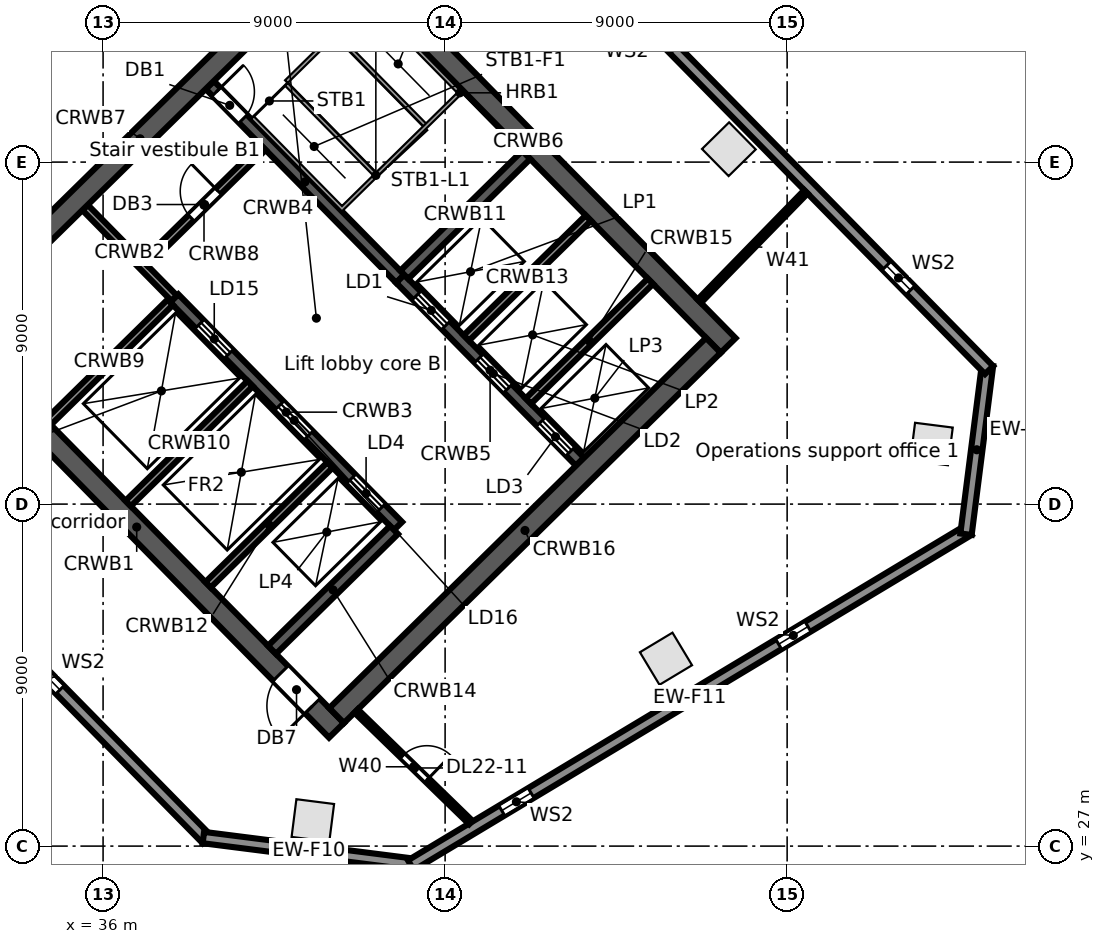
"""IFC4 building model, lengths in metres.
Left out: names, types, materials, properties, quantities, classifications, styles, units other than length and angle.
Written with IfcOpenShell. Run it as: python <this file> out.ifc"""

import sys

from ifc_helpers import new_model, si_unit, direction, frame, frame_2d, origin, origin_2d, place, context, subcontext, project, spatial, rectangle, extrude, element, fill, save


model = new_model("IFC4")
c1 = context("Model", 3, precision=1e-05, world=origin(), true_north=direction((0.0, 1.0)))
c2 = subcontext(c1, "Body", "Model", "MODEL_VIEW")
j1 = project(units=[si_unit("LENGTHUNIT", "METRE"), si_unit("PLANEANGLEUNIT", "RADIAN")], contexts=[c1])
p1 = place(None, origin())
s1 = spatial("IfcSite", under=j1, at=p1, CompositionType="ELEMENT")
p2 = place(p1, origin())
s2 = spatial("IfcBuilding", under=s1, at=p2, CompositionType="ELEMENT")
p3 = place(p2, frame((0.0, 0.0, 110.3)))
s3 = spatial("IfcBuildingStorey", under=s2, at=p3, CompositionType="ELEMENT", Elevation=110.3)
for number, where, z_axis, x_axis in (
    (1, (41.52, 27.675, 0.0), (0.0, 0.0, 1.0), (0.992, -0.126, 0.0)),
    (2, (50.812, 31.931, 0.0), (0.0, 0.0, 1.0), (0.857, 0.515, 0.0)),
    (3, (57.799, 37.581, 0.0), (0.0, 0.0, 1.0), (0.126, 0.992, 0.0)),
    (4, (52.467, 45.339, 0.0), (0.0, 0.0, 1.0), (-0.701, 0.713, 0.0)),
):
    element("IfcColumn", number, at=place(p3, frame(where, z_axis=z_axis, x_axis=x_axis)), inside=s3, PredefinedType="COLUMN", context=c2, shape_type="SweptSolid", body=[
        extrude(rectangle(XDim=1.0, YDim=1.0, at=origin_2d()), origin(), (0.0, 0.0, 1.0), 4.4),
    ])
p4 = place(p3, frame((38.727, 27.181, 0.0), z_axis=(0.0, 0.0, 1.0), x_axis=(-0.700906405975, 0.713253258011, 0.0)))
e5 = element("IfcWall", 5, at=p4, inside=s3, PredefinedType="STANDARD", context=c2, shape_type="SweptSolid", body=[
    extrude(rectangle(XDim=18.923, YDim=0.3, at=frame_2d((9.462, 0.0))), origin(), (0.0, 0.0, 1.0), 4.08),
])
p5 = place(p4, frame((14.967, 0.0, 0.6)))
e6 = element("IfcOpeningElement", 6, at=p5, cuts=e5, PredefinedType="OPENING", context=c2, shape_type="SweptSolid", body=[
    extrude(rectangle(XDim=0.9, YDim=2.8, at=frame_2d((0.45, 1.4))), frame((0.0, 0.16, 0.0), z_axis=(0.0, -1.0, 0.0), x_axis=(1.0, 0.0, 0.0)), (0.0, 0.0, 1.0), 0.32),
])
p6 = place(p4, frame((5.512, 0.0, 0.6)))
e7 = element("IfcOpeningElement", 7, at=p6, cuts=e5, PredefinedType="OPENING", context=c2, shape_type="SweptSolid", body=[
    extrude(rectangle(XDim=0.9, YDim=2.8, at=frame_2d((0.45, 1.4))), frame((0.0, 0.16, 0.0), z_axis=(0.0, -1.0, 0.0), x_axis=(1.0, 0.0, 0.0)), (0.0, 0.0, 1.0), 0.32),
])
p7 = place(p3, frame((44.196, 26.518, 0.0), z_axis=(0.0, 0.0, 1.0), x_axis=(-0.992001881269, 0.126223086474, 0.0)))
e8 = element("IfcWall", 8, at=p7, inside=s3, PredefinedType="STANDARD", context=c2, shape_type="SweptSolid", body=[
    extrude(rectangle(XDim=5.602, YDim=0.3, at=frame_2d((2.801, 0.0))), origin(), (0.0, 0.0, 1.0), 4.08),
])
p8 = place(p3, frame((58.778, 35.318, 0.0), z_axis=(0.0, 0.0, 1.0), x_axis=(-0.857168206138, -0.515036568009, 0.0)))
e9 = element("IfcWall", 9, at=p8, inside=s3, PredefinedType="STANDARD", context=c2, shape_type="SweptSolid", body=[
    extrude(rectangle(XDim=17.125, YDim=0.3, at=frame_2d((8.562, 0.0))), origin(), (0.0, 0.0, 1.0), 4.08),
])
p9 = place(p8, frame((13.435, 0.0, 0.6)))
e10 = element("IfcOpeningElement", 10, at=p9, cuts=e9, PredefinedType="OPENING", context=c2, shape_type="SweptSolid", body=[
    extrude(rectangle(XDim=0.9, YDim=2.8, at=frame_2d((0.45, 1.4))), frame((0.0, 0.16, 0.0), z_axis=(0.0, -1.0, 0.0), x_axis=(1.0, 0.0, 0.0)), (0.0, 0.0, 1.0), 0.32),
])
p10 = place(p8, frame((4.935, 0.0, 0.6)))
e11 = element("IfcOpeningElement", 11, at=p10, cuts=e9, PredefinedType="OPENING", context=c2, shape_type="SweptSolid", body=[
    extrude(rectangle(XDim=0.9, YDim=2.8, at=frame_2d((0.45, 1.4))), frame((0.0, 0.16, 0.0), z_axis=(0.0, -1.0, 0.0), x_axis=(1.0, 0.0, 0.0)), (0.0, 0.0, 1.0), 0.32),
])
p11 = place(p3, frame((59.272, 39.651, 0.0), z_axis=(0.0, 0.0, 1.0), x_axis=(-0.126181137886, -0.992007217938, 0.0)))
e12 = element("IfcWall", 12, at=p11, inside=s3, PredefinedType="STANDARD", context=c2, shape_type="SweptSolid", body=[
    extrude(rectangle(XDim=4.479, YDim=0.3, at=frame_2d((2.24, 0.0))), origin(), (0.0, 0.0, 1.0), 4.08),
])
p12 = place(p3, frame((40.594, 58.577, 0.0), z_axis=(0.0, 0.0, 1.0), x_axis=(0.700909719808, -0.713250001528, 0.0)))
e13 = element("IfcWall", 13, at=p12, inside=s3, PredefinedType="STANDARD", context=c2, shape_type="SweptSolid", body=[
    extrude(rectangle(XDim=26.708, YDim=0.3, at=frame_2d((13.354, 0.0))), origin(), (0.0, 0.0, 1.0), 4.08),
])
p13 = place(p12, frame((22.858, 0.0, 0.6)))
e14 = element("IfcOpeningElement", 14, at=p13, cuts=e13, PredefinedType="OPENING", context=c2, shape_type="SweptSolid", body=[
    extrude(rectangle(XDim=0.9, YDim=2.8, at=frame_2d((0.45, 1.4))), frame((0.0, 0.16, 0.0), z_axis=(0.0, -1.0, 0.0), x_axis=(1.0, 0.0, 0.0)), (0.0, 0.0, 1.0), 0.32),
])
p14 = place(p12, frame((13.987, 0.0, 0.6)))
e15 = element("IfcOpeningElement", 15, at=p14, cuts=e13, PredefinedType="OPENING", context=c2, shape_type="SweptSolid", body=[
    extrude(rectangle(XDim=0.9, YDim=2.8, at=frame_2d((0.45, 1.4))), frame((0.0, 0.16, 0.0), z_axis=(0.0, -1.0, 0.0), x_axis=(1.0, 0.0, 0.0)), (0.0, 0.0, 1.0), 0.32),
])
p15 = place(p12, frame((5.115, 0.0, 0.6)))
e16 = element("IfcOpeningElement", 16, at=p15, cuts=e13, PredefinedType="OPENING", context=c2, shape_type="SweptSolid", body=[
    extrude(rectangle(XDim=0.9, YDim=2.8, at=frame_2d((0.45, 1.4))), frame((0.0, 0.16, 0.0), z_axis=(0.0, -1.0, 0.0), x_axis=(1.0, 0.0, 0.0)), (0.0, 0.0, 1.0), 0.32),
])
p16 = place(p3, frame((31.628, 40.745, 0.0), z_axis=(0.0, 0.0, 1.0), x_axis=(0.700911255944, -0.713248491965, 0.0)))
e17 = element("IfcWall", 17, at=p16, inside=s3, PredefinedType="SOLIDWALL", context=c2, shape_type="SweptSolid", body=[
    extrude(rectangle(XDim=15.0, YDim=0.55, at=frame_2d((7.5, 0.0))), origin(), (0.0, 0.0, 1.0), 4.08),
])
p17 = place(p16, frame((12.9, 0.0, 0.0)))
e18 = element("IfcOpeningElement", 18, at=p17, cuts=e17, PredefinedType="OPENING", context=c2, shape_type="SweptSolid", body=[
    extrude(rectangle(XDim=1.2, YDim=2.1, at=frame_2d((0.6, 1.05))), frame((0.0, 0.285, 0.0), z_axis=(0.0, -1.0, 0.0), x_axis=(1.0, 0.0, 0.0)), (0.0, 0.0, 1.0), 0.57),
])
p18 = place(p3, frame((35.526, 43.805, 0.0), z_axis=(0.0, 0.0, 1.0), x_axis=(0.700884863746, -0.713274426691, 0.0)))
e19 = element("IfcWall", 19, at=p18, inside=s3, PredefinedType="SOLIDWALL", context=c2, shape_type="SweptSolid", body=[
    extrude(rectangle(XDim=3.35, YDim=0.2, at=frame_2d((1.675, 0.0))), origin(), (0.0, 0.0, 1.0), 4.08),
])
p19 = place(p3, frame((37.874, 41.416, 0.0), z_axis=(0.0, 0.0, 1.0), x_axis=(0.700918271237, -0.71324159795, 0.0)))
e20 = element("IfcWall", 20, at=p19, inside=s3, PredefinedType="SOLIDWALL", context=c2, shape_type="SweptSolid", body=[
    extrude(rectangle(XDim=8.4, YDim=0.3, at=frame_2d((4.2, 0.0))), origin(), (0.0, 0.0, 1.0), 4.08),
])
p20 = place(p19, frame((0.95, 0.0, 0.0)))
e21 = element("IfcOpeningElement", 21, at=p20, cuts=e20, PredefinedType="OPENING", context=c2, shape_type="SweptSolid", body=[
    extrude(rectangle(XDim=1.1, YDim=2.1, at=frame_2d((0.55, 1.05))), frame((0.0, 0.16, 0.0), z_axis=(0.0, -1.0, 0.0), x_axis=(1.0, 0.0, 0.0)), (0.0, 0.0, 1.0), 0.32),
])
p21 = place(p19, frame((3.95, 0.0, 0.0)))
e22 = element("IfcOpeningElement", 22, at=p21, cuts=e20, PredefinedType="OPENING", context=c2, shape_type="SweptSolid", body=[
    extrude(rectangle(XDim=1.1, YDim=2.1, at=frame_2d((0.55, 1.05))), frame((0.0, 0.16, 0.0), z_axis=(0.0, -1.0, 0.0), x_axis=(1.0, 0.0, 0.0)), (0.0, 0.0, 1.0), 0.32),
])
p22 = place(p19, frame((6.65, 0.0, 0.0)))
e23 = element("IfcOpeningElement", 23, at=p22, cuts=e20, PredefinedType="OPENING", context=c2, shape_type="SweptSolid", body=[
    extrude(rectangle(XDim=1.1, YDim=2.1, at=frame_2d((0.55, 1.05))), frame((0.0, 0.16, 0.0), z_axis=(0.0, -1.0, 0.0), x_axis=(1.0, 0.0, 0.0)), (0.0, 0.0, 1.0), 0.32),
])
p23 = place(p3, frame((38.807, 47.029, 0.0), z_axis=(0.0, 0.0, 1.0), x_axis=(0.700916852778, -0.713242991898, 0.0)))
e24 = element("IfcWall", 24, at=p23, inside=s3, PredefinedType="SOLIDWALL", context=c2, shape_type="SweptSolid", body=[
    extrude(rectangle(XDim=7.15, YDim=0.3, at=frame_2d((3.575, 0.0))), origin(), (0.0, 0.0, 1.0), 4.08),
])
p24 = place(p23, frame((0.25, 0.0, 0.0)))
e25 = element("IfcOpeningElement", 25, at=p24, cuts=e24, PredefinedType="OPENING", context=c2, shape_type="SweptSolid", body=[
    extrude(rectangle(XDim=1.0, YDim=2.1, at=frame_2d((0.5, 1.05))), frame((0.0, 0.16, 0.0), z_axis=(0.0, -1.0, 0.0), x_axis=(1.0, 0.0, 0.0)), (0.0, 0.0, 1.0), 0.32),
])
p25 = place(p3, frame((43.819, 41.929, 0.0), z_axis=(0.0, 0.0, 1.0), x_axis=(0.700931209592, -0.713228882912, 0.0)))
e26 = element("IfcWall", 26, at=p25, inside=s3, PredefinedType="SOLIDWALL", context=c2, shape_type="SweptSolid", body=[
    extrude(rectangle(XDim=6.75, YDim=0.3, at=frame_2d((3.375, 0.0))), origin(), (0.0, 0.0, 1.0), 4.08),
])
p26 = place(p25, frame((0.615, 0.0, 0.0)))
e27 = element("IfcOpeningElement", 27, at=p26, cuts=e26, PredefinedType="OPENING", context=c2, shape_type="SweptSolid", body=[
    extrude(rectangle(XDim=1.1, YDim=2.1, at=frame_2d((0.55, 1.05))), frame((0.0, 0.16, 0.0), z_axis=(0.0, -1.0, 0.0), x_axis=(1.0, 0.0, 0.0)), (0.0, 0.0, 1.0), 0.32),
])
p27 = place(p25, frame((2.945, 0.0, 0.0)))
e28 = element("IfcOpeningElement", 28, at=p27, cuts=e26, PredefinedType="OPENING", context=c2, shape_type="SweptSolid", body=[
    extrude(rectangle(XDim=1.1, YDim=2.1, at=frame_2d((0.55, 1.05))), frame((0.0, 0.16, 0.0), z_axis=(0.0, -1.0, 0.0), x_axis=(1.0, 0.0, 0.0)), (0.0, 0.0, 1.0), 0.32),
])
p28 = place(p25, frame((5.28, 0.0, 0.0)))
e29 = element("IfcOpeningElement", 29, at=p28, cuts=e26, PredefinedType="OPENING", context=c2, shape_type="SweptSolid", body=[
    extrude(rectangle(XDim=1.1, YDim=2.1, at=frame_2d((0.55, 1.05))), frame((0.0, 0.16, 0.0), z_axis=(0.0, -1.0, 0.0), x_axis=(1.0, 0.0, 0.0)), (0.0, 0.0, 1.0), 0.32),
])
p29 = place(p3, frame((41.934, 50.873, 0.0), z_axis=(0.0, 0.0, 1.0), x_axis=(0.700911255944, -0.713248491965, 0.0)))
e30 = element("IfcWall", 30, at=p29, inside=s3, PredefinedType="SOLIDWALL", context=c2, shape_type="SweptSolid", body=[
    extrude(rectangle(XDim=15.0, YDim=0.55, at=frame_2d((7.5, 0.0))), origin(), (0.0, 0.0, 1.0), 4.08),
])
p30 = place(p3, frame((32.017, 40.742, 0.0), z_axis=(0.0, 0.0, 1.0), x_axis=(0.713253550094, 0.700906108746, 0.0)))
e31 = element("IfcWall", 31, at=p30, inside=s3, PredefinedType="SOLIDWALL", context=c2, shape_type="SweptSolid", body=[
    extrude(rectangle(XDim=13.9, YDim=0.55, at=frame_2d((6.95, 0.0))), origin(), (0.0, 0.0, 1.0), 4.08),
])
p31 = place(p3, frame((37.104, 42.342, 0.0), z_axis=(0.0, 0.0, 1.0), x_axis=(0.713281298468, 0.700877870428, 0.0)))
e32 = element("IfcWall", 32, at=p31, inside=s3, PredefinedType="PARTITIONING", context=c2, shape_type="SweptSolid", body=[
    extrude(rectangle(XDim=4.35, YDim=0.2, at=frame_2d((2.175, 0.0))), origin(), (0.0, 0.0, 1.0), 4.08),
])
p32 = place(p31, frame((1.7, 0.0, 0.0)))
e33 = element("IfcOpeningElement", 33, at=p32, cuts=e32, PredefinedType="OPENING", context=c2, shape_type="SweptSolid", body=[
    extrude(rectangle(XDim=1.0, YDim=2.1, at=frame_2d((0.5, 1.05))), frame((0.0, 0.11, 0.0), z_axis=(0.0, -1.0, 0.0), x_axis=(1.0, 0.0, 0.0)), (0.0, 0.0, 1.0), 0.22),
])
p33 = place(p3, frame((34.558, 38.156, 0.0), z_axis=(0.0, 0.0, 1.0), x_axis=(0.713237924006, 0.700922009755, 0.0)))
e34 = element("IfcWall", 34, at=p33, inside=s3, PredefinedType="SOLIDWALL", context=c2, shape_type="SweptSolid", body=[
    extrude(rectangle(XDim=4.5, YDim=0.2, at=frame_2d((2.25, 0.0))), origin(), (0.0, 0.0, 1.0), 4.08),
])
p34 = place(p3, frame((36.66, 36.017, 0.0), z_axis=(0.0, 0.0, 1.0), x_axis=(0.713264577552, 0.700894886848, 0.0)))
e35 = element("IfcWall", 35, at=p34, inside=s3, PredefinedType="SOLIDWALL", context=c2, shape_type="SweptSolid", body=[
    extrude(rectangle(XDim=4.5, YDim=0.2, at=frame_2d((2.25, 0.0))), origin(), (0.0, 0.0, 1.0), 4.08),
])
p35 = place(p3, frame((43.926, 42.034, 0.0), z_axis=(0.0, 0.0, 1.0), x_axis=(0.713210801054, 0.700949608217, 0.0)))
e36 = element("IfcWall", 36, at=p35, inside=s3, PredefinedType="SOLIDWALL", context=c2, shape_type="SweptSolid", body=[
    extrude(rectangle(XDim=4.5, YDim=0.3, at=frame_2d((2.25, 0.0))), origin(), (0.0, 0.0, 1.0), 4.08),
])
p36 = place(p3, frame((38.763, 33.877, 0.0), z_axis=(0.0, 0.0, 1.0), x_axis=(0.713237455685, 0.700922486305, 0.0)))
e37 = element("IfcWall", 37, at=p36, inside=s3, PredefinedType="SOLIDWALL", context=c2, shape_type="SweptSolid", body=[
    extrude(rectangle(XDim=4.5, YDim=0.2, at=frame_2d((2.25, 0.0))), origin(), (0.0, 0.0, 1.0), 4.08),
])
p37 = place(p3, frame((45.559, 40.373, 0.0), z_axis=(0.0, 0.0, 1.0), x_axis=(0.713264577552, 0.700894886848, 0.0)))
e38 = element("IfcWall", 38, at=p37, inside=s3, PredefinedType="SOLIDWALL", context=c2, shape_type="SweptSolid", body=[
    extrude(rectangle(XDim=4.5, YDim=0.2, at=frame_2d((2.25, 0.0))), origin(), (0.0, 0.0, 1.0), 4.08),
])
p38 = place(p3, frame((40.445, 32.165, 0.0), z_axis=(0.0, 0.0, 1.0), x_axis=(0.713264577552, 0.700894886848, 0.0)))
e39 = element("IfcWall", 39, at=p38, inside=s3, PredefinedType="SOLIDWALL", context=c2, shape_type="SweptSolid", body=[
    extrude(rectangle(XDim=4.5, YDim=0.3, at=frame_2d((2.25, 0.0))), origin(), (0.0, 0.0, 1.0), 4.08),
])
p39 = place(p3, frame((47.192, 38.711, 0.0), z_axis=(0.0, 0.0, 1.0), x_axis=(0.713264577552, 0.700894886848, 0.0)))
e40 = element("IfcWall", 40, at=p39, inside=s3, PredefinedType="SOLIDWALL", context=c2, shape_type="SweptSolid", body=[
    extrude(rectangle(XDim=4.5, YDim=0.2, at=frame_2d((2.25, 0.0))), origin(), (0.0, 0.0, 1.0), 4.08),
])
p40 = place(p3, frame((42.145, 30.435, 0.0), z_axis=(0.0, 0.0, 1.0), x_axis=(0.713253550094, 0.700906108746, 0.0)))
e41 = element("IfcWall", 41, at=p40, inside=s3, PredefinedType="SOLIDWALL", context=c2, shape_type="SweptSolid", body=[
    extrude(rectangle(XDim=13.9, YDim=0.55, at=frame_2d((6.95, 0.0))), origin(), (0.0, 0.0, 1.0), 4.08),
])
p41 = place(p3, frame((42.659, 30.555, 0.0), z_axis=(0.0, 0.0, 1.0), x_axis=(0.716925671772, -0.697149611743, 0.0)))
e42 = element("IfcWall", 42, at=p41, inside=s3, PredefinedType="PARTITIONING", context=c2, shape_type="SweptSolid", body=[
    extrude(rectangle(XDim=4.21, YDim=0.125, at=frame_2d((2.105, 0.0))), origin(), (0.0, 0.0, 1.0), 3.352),
])
p42 = place(p41, frame((1.7, 0.0, 0.0)))
e43 = element("IfcOpeningElement", 43, at=p42, cuts=e42, PredefinedType="OPENING", context=c2, shape_type="SweptSolid", body=[
    extrude(rectangle(XDim=0.9, YDim=2.1, at=frame_2d((0.45, 1.05))), frame((0.0, 0.073, 0.0), z_axis=(0.0, -1.0, 0.0), x_axis=(1.0, 0.0, 0.0)), (0.0, 0.0, 1.0), 0.145),
])
p43 = place(p3, frame((51.688, 41.34, 0.0), z_axis=(0.0, 0.0, 1.0), x_axis=(0.698090794369, 0.716009247718, 0.0)))
e44 = element("IfcWall", 44, at=p43, inside=s3, PredefinedType="PARTITIONING", context=c2, shape_type="SweptSolid", body=[
    extrude(rectangle(XDim=4.019, YDim=0.125, at=frame_2d((2.01, 0.0))), origin(), (0.0, 0.0, 1.0), 3.36),
])
p44 = place(p6, origin())
e45 = element("IfcWindow", 45, at=p44, inside=s3, PartitioningType="SINGLE_PANEL", PredefinedType="WINDOW", context=c2, shape_type="SweptSolid", body=[
    extrude(rectangle(XDim=0.9, YDim=2.8, at=frame_2d((0.45, 1.4))), frame((0.0, 0.03, 0.0), z_axis=(0.0, -1.0, 0.0), x_axis=(1.0, 0.0, 0.0)), (0.0, 0.0, 1.0), 0.06),
])
fill(e7, e45)
p45 = place(p9, origin())
e46 = element("IfcWindow", 46, at=p45, inside=s3, PartitioningType="SINGLE_PANEL", PredefinedType="WINDOW", context=c2, shape_type="SweptSolid", body=[
    extrude(rectangle(XDim=0.9, YDim=2.8, at=frame_2d((0.45, 1.4))), frame((0.0, 0.03, 0.0), z_axis=(0.0, -1.0, 0.0), x_axis=(1.0, 0.0, 0.0)), (0.0, 0.0, 1.0), 0.06),
])
fill(e10, e46)
p46 = place(p10, origin())
e47 = element("IfcWindow", 47, at=p46, inside=s3, PartitioningType="SINGLE_PANEL", PredefinedType="WINDOW", context=c2, shape_type="SweptSolid", body=[
    extrude(rectangle(XDim=0.9, YDim=2.8, at=frame_2d((0.45, 1.4))), frame((0.0, 0.03, 0.0), z_axis=(0.0, -1.0, 0.0), x_axis=(1.0, 0.0, 0.0)), (0.0, 0.0, 1.0), 0.06),
])
fill(e11, e47)
p47 = place(p13, origin())
e48 = element("IfcWindow", 48, at=p47, inside=s3, PartitioningType="SINGLE_PANEL", PredefinedType="WINDOW", context=c2, shape_type="SweptSolid", body=[
    extrude(rectangle(XDim=0.9, YDim=2.8, at=frame_2d((0.45, 1.4))), frame((0.0, 0.03, 0.0), z_axis=(0.0, -1.0, 0.0), x_axis=(1.0, 0.0, 0.0)), (0.0, 0.0, 1.0), 0.06),
])
fill(e14, e48)
p48 = place(p26, origin())
e49 = element("IfcDoor", 49, at=p48, inside=s3, OperationType="DOUBLE_DOOR_SLIDING", PredefinedType="DOOR", context=c2, shape_type="SweptSolid", body=[
    extrude(rectangle(XDim=1.1, YDim=2.1, at=frame_2d((0.55, 1.05))), frame((0.0, 0.025, 0.0), z_axis=(0.0, -1.0, 0.0), x_axis=(1.0, 0.0, 0.0)), (0.0, 0.0, 1.0), 0.05),
])
fill(e27, e49)
p49 = place(p27, origin())
e50 = element("IfcDoor", 50, at=p49, inside=s3, OperationType="DOUBLE_DOOR_SLIDING", PredefinedType="DOOR", context=c2, shape_type="SweptSolid", body=[
    extrude(rectangle(XDim=1.1, YDim=2.1, at=frame_2d((0.55, 1.05))), frame((0.0, 0.025, 0.0), z_axis=(0.0, -1.0, 0.0), x_axis=(1.0, 0.0, 0.0)), (0.0, 0.0, 1.0), 0.05),
])
fill(e28, e50)
p50 = place(p28, origin())
e51 = element("IfcDoor", 51, at=p50, inside=s3, OperationType="DOUBLE_DOOR_SLIDING", PredefinedType="DOOR", context=c2, shape_type="SweptSolid", body=[
    extrude(rectangle(XDim=1.1, YDim=2.1, at=frame_2d((0.55, 1.05))), frame((0.0, 0.025, 0.0), z_axis=(0.0, -1.0, 0.0), x_axis=(1.0, 0.0, 0.0)), (0.0, 0.0, 1.0), 0.05),
])
fill(e29, e51)
p51 = place(p20, origin())
e52 = element("IfcDoor", 52, at=p51, inside=s3, OperationType="DOUBLE_DOOR_SLIDING", PredefinedType="DOOR", context=c2, shape_type="SweptSolid", body=[
    extrude(rectangle(XDim=1.1, YDim=2.1, at=frame_2d((0.55, 1.05))), frame((0.0, 0.025, 0.0), z_axis=(0.0, -1.0, 0.0), x_axis=(1.0, 0.0, 0.0)), (0.0, 0.0, 1.0), 0.05),
])
fill(e21, e52)
p52 = place(p21, origin())
e53 = element("IfcDoor", 53, at=p52, inside=s3, OperationType="DOUBLE_DOOR_SLIDING", PredefinedType="DOOR", context=c2, shape_type="SweptSolid", body=[
    extrude(rectangle(XDim=1.1, YDim=2.1, at=frame_2d((0.55, 1.05))), frame((0.0, 0.025, 0.0), z_axis=(0.0, -1.0, 0.0), x_axis=(1.0, 0.0, 0.0)), (0.0, 0.0, 1.0), 0.05),
])
fill(e22, e53)
p53 = place(p22, origin())
e54 = element("IfcDoor", 54, at=p53, inside=s3, OperationType="DOUBLE_DOOR_SLIDING", PredefinedType="DOOR", context=c2, shape_type="SweptSolid", body=[
    extrude(rectangle(XDim=1.1, YDim=2.1, at=frame_2d((0.55, 1.05))), frame((0.0, 0.025, 0.0), z_axis=(0.0, -1.0, 0.0), x_axis=(1.0, 0.0, 0.0)), (0.0, 0.0, 1.0), 0.05),
])
fill(e23, e54)
p54 = place(p24, origin())
e55 = element("IfcDoor", 55, at=p54, inside=s3, OperationType="SINGLE_SWING_LEFT", PredefinedType="DOOR", context=c2, shape_type="SweptSolid", body=[
    extrude(rectangle(XDim=1.0, YDim=2.1, at=frame_2d((0.5, 1.05))), frame((0.0, 0.025, 0.0), z_axis=(0.0, -1.0, 0.0), x_axis=(1.0, 0.0, 0.0)), (0.0, 0.0, 1.0), 0.05),
])
fill(e25, e55)
p55 = place(p32, origin())
e56 = element("IfcDoor", 56, at=p55, inside=s3, OperationType="SINGLE_SWING_RIGHT", PredefinedType="DOOR", context=c2, shape_type="SweptSolid", body=[
    extrude(rectangle(XDim=1.0, YDim=2.1, at=frame_2d((0.5, 1.05))), frame((0.0, 0.025, 0.0), z_axis=(0.0, -1.0, 0.0), x_axis=(1.0, 0.0, 0.0)), (0.0, 0.0, 1.0), 0.05),
])
fill(e33, e56)
p56 = place(p17, frame((1.2, 0.0, 0.0), z_axis=(0.0, 0.0, 1.0), x_axis=(-1.0, 0.0, 0.0)))
e57 = element("IfcDoor", 57, at=p56, inside=s3, OperationType="SINGLE_SWING_LEFT", PredefinedType="DOOR", context=c2, shape_type="SweptSolid", body=[
    extrude(rectangle(XDim=1.2, YDim=2.1, at=frame_2d((0.6, 1.05))), frame((0.0, 0.025, 0.0), z_axis=(0.0, -1.0, 0.0), x_axis=(1.0, 0.0, 0.0)), (0.0, 0.0, 1.0), 0.05),
])
fill(e18, e57)
p57 = place(p42, origin())
e58 = element("IfcDoor", 58, at=p57, inside=s3, OperationType="SINGLE_SWING_RIGHT", PredefinedType="DOOR", context=c2, shape_type="SweptSolid", body=[
    extrude(rectangle(XDim=0.9, YDim=2.1, at=frame_2d((0.45, 1.05))), frame((0.0, 0.025, 0.0), z_axis=(0.0, -1.0, 0.0), x_axis=(1.0, 0.0, 0.0)), (0.0, 0.0, 1.0), 0.05),
])
fill(e43, e58)
save(model, sys.argv[1])
